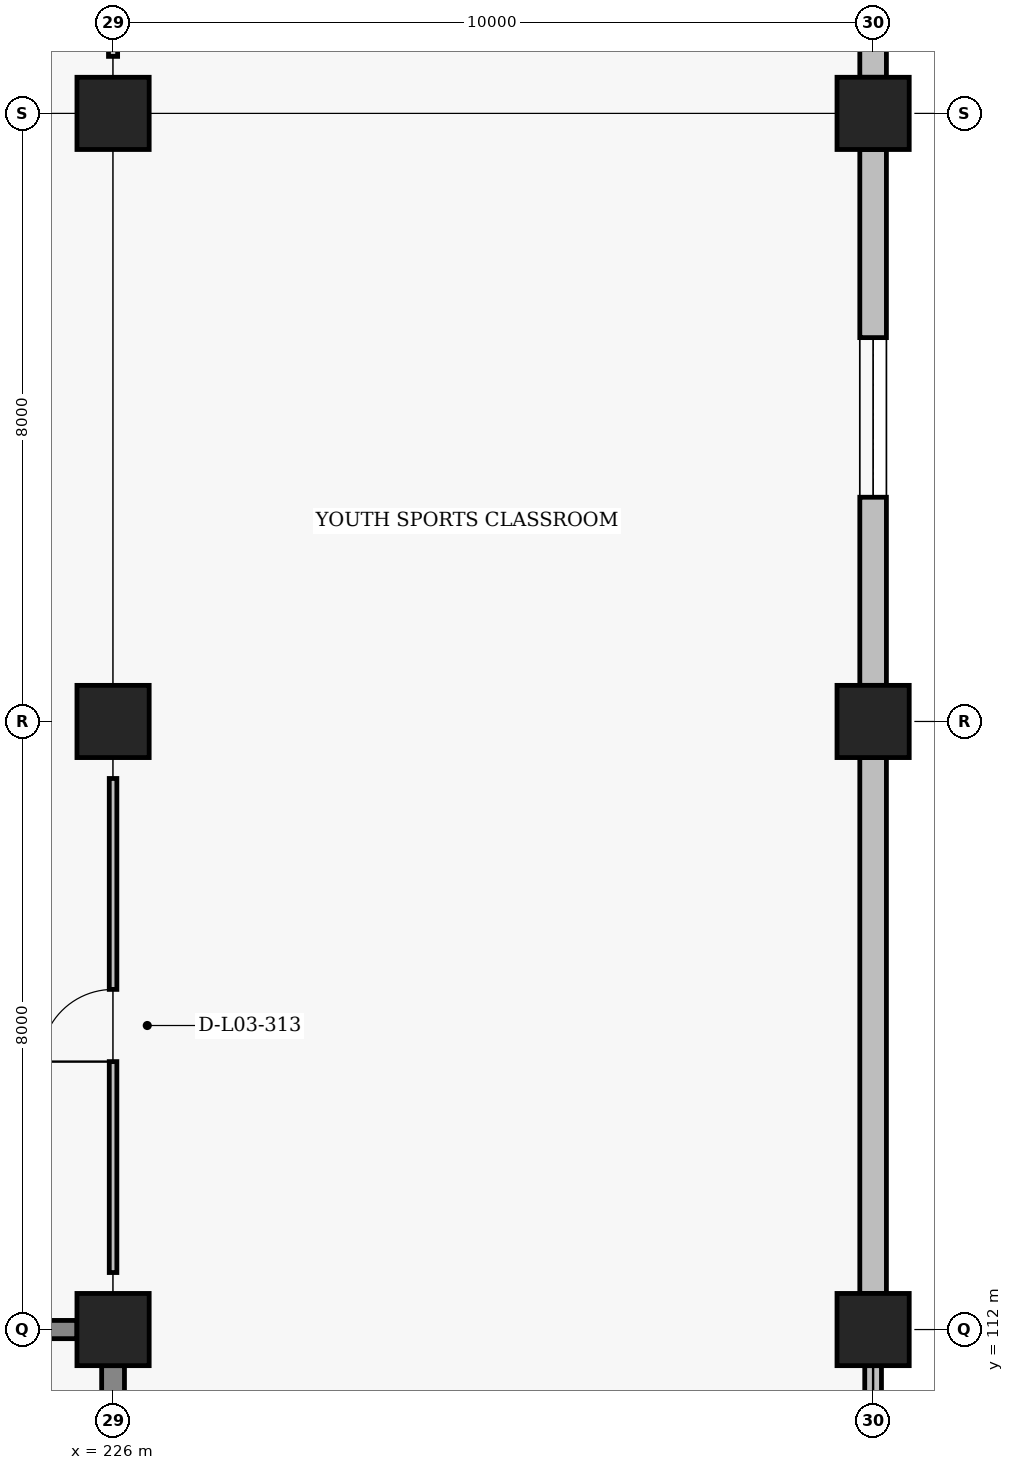
"""IFC4 building model, lengths in metres.
Left out: names, types, materials, properties, quantities, classifications, styles, units other than length and angle.
Written with IfcOpenShell. Run it as: python <this file> out.ifc"""

import sys

from ifc_helpers import new_model, si_unit, direction, frame, frame_2d, origin, origin_2d, place, context, subcontext, project, spatial, rectangle, extrude, element, fill, save


model = new_model("IFC4")
c1 = context("Model", 3, precision=1e-05, world=origin(), true_north=direction((0.0, 1.0)))
c2 = subcontext(c1, "Body", "Model", "MODEL_VIEW")
j1 = project(units=[si_unit("LENGTHUNIT", "METRE"), si_unit("PLANEANGLEUNIT", "RADIAN")], contexts=[c1])
p1 = place(None, origin())
s1 = spatial("IfcSite", under=j1, at=p1, CompositionType="ELEMENT")
p2 = place(p1, origin())
s2 = spatial("IfcBuilding", under=s1, at=p2, CompositionType="ELEMENT")
p3 = place(p2, frame((0.0, 0.0, 9.6)))
s3 = spatial("IfcBuildingStorey", under=s2, at=p3, CompositionType="ELEMENT", Elevation=9.6)
for number, where, z_axis, x_axis in (
    (1, (226.0, 112.0, 0.0), (0.0, 0.0, 1.0), (1.0, 0.0, 0.0)),
    (2, (226.0, 120.0, 0.0), (0.0, 0.0, 1.0), (1.0, 0.0, 0.0)),
    (3, (226.0, 128.0, 0.0), (0.0, 0.0, 1.0), (1.0, 0.0, 0.0)),
    (4, (236.0, 112.0, 0.0), (0.0, 0.0, 1.0), (1.0, 0.0, 0.0)),
    (5, (236.0, 120.0, 0.0), (0.0, 0.0, 1.0), (1.0, 0.0, 0.0)),
    (6, (236.0, 128.0, 0.0), (0.0, 0.0, 1.0), (1.0, 0.0, 0.0)),
):
    element("IfcColumn", number, at=place(p3, frame(where, z_axis=z_axis, x_axis=x_axis)), inside=s3, PredefinedType="COLUMN", context=c2, shape_type="SweptSolid", body=[
        extrude(rectangle(XDim=0.95, YDim=0.95, at=origin_2d()), origin(), (0.0, 0.0, 1.0), 4.8),
    ])
p4 = place(p3, frame((236.0, 104.475, 0.0), z_axis=(0.0, 0.0, 1.0), x_axis=(0.0, 1.0, 0.0)))
e7 = element("IfcWall", 7, at=p4, inside=s3, PredefinedType="PARAPET", context=c2, shape_type="SweptSolid", body=[
    extrude(rectangle(XDim=7.05, YDim=0.22, at=frame_2d((3.525, 0.0))), origin(), (0.0, 0.0, 1.0), 0.16),
])
p5 = place(p3, frame((236.0, 112.475, 0.0), z_axis=(0.0, 0.0, 1.0), x_axis=(0.0, 1.0, 0.0)))
e8 = element("IfcWall", 8, at=p5, inside=s3, PredefinedType="SOLIDWALL", context=c2, shape_type="SweptSolid", body=[
    extrude(rectangle(XDim=7.05, YDim=0.35, at=frame_2d((3.525, 0.0))), origin(), (0.0, 0.0, 1.0), 3.83),
])
p6 = place(p3, frame((236.0, 120.475, 0.0), z_axis=(0.0, 0.0, 1.0), x_axis=(0.0, 1.0, 0.0)))
e9 = element("IfcWall", 9, at=p6, inside=s3, PredefinedType="SOLIDWALL", context=c2, shape_type="SweptSolid", body=[
    extrude(rectangle(XDim=7.05, YDim=0.35, at=frame_2d((3.525, 0.0))), origin(), (0.0, 0.0, 1.0), 3.83),
])
p7 = place(p6, frame((2.475, 0.0, 0.95)))
e10 = element("IfcOpeningElement", 10, at=p7, cuts=e9, PredefinedType="OPENING", context=c2, shape_type="SweptSolid", body=[
    extrude(rectangle(XDim=2.1, YDim=1.9, at=frame_2d((1.05, 0.95))), frame((0.0, 0.185, 0.0), z_axis=(0.0, -1.0, 0.0), x_axis=(1.0, 0.0, 0.0)), (0.0, 0.0, 1.0), 0.37),
])
p8 = place(p3, frame((236.0, 128.475, 0.0), z_axis=(0.0, 0.0, 1.0), x_axis=(0.0, 1.0, 0.0)))
e11 = element("IfcWall", 11, at=p8, inside=s3, PredefinedType="SOLIDWALL", context=c2, shape_type="SweptSolid", body=[
    extrude(rectangle(XDim=7.05, YDim=0.35, at=frame_2d((3.525, 0.0))), origin(), (0.0, 0.0, 1.0), 3.83),
])
p9 = place(p3, frame((216.475, 112.0, 0.0), z_axis=(0.0, 0.0, 1.0), x_axis=(1.0, 0.0, 0.0)))
e12 = element("IfcWall", 12, at=p9, inside=s3, PredefinedType="SHEAR", context=c2, shape_type="SweptSolid", body=[
    extrude(rectangle(XDim=9.05, YDim=0.24, at=frame_2d((4.525, 0.0))), origin(), (0.0, 0.0, 1.0), 3.68),
])
p10 = place(p3, frame((226.0, 104.475, 0.0), z_axis=(0.0, 0.0, 1.0), x_axis=(0.0, 1.0, 0.0)))
e13 = element("IfcWall", 13, at=p10, inside=s3, PredefinedType="SHEAR", context=c2, shape_type="SweptSolid", body=[
    extrude(rectangle(XDim=7.05, YDim=0.3, at=frame_2d((3.525, 0.0))), origin(), (0.0, 0.0, 1.0), 3.83),
])
p11 = place(p3, frame((226.0, 112.75, 0.0), z_axis=(0.0, 0.0, 1.0), x_axis=(0.0, 1.0, 0.0)))
e14 = element("IfcWall", 14, at=p11, inside=s3, PredefinedType="PARTITIONING", context=c2, shape_type="SweptSolid", body=[
    extrude(rectangle(XDim=6.5, YDim=0.1, at=frame_2d((3.25, 0.0))), origin(), (0.0, 0.0, 1.0), 3.93),
])
p12 = place(p11, frame((2.775, 0.0, 0.0)))
e15 = element("IfcOpeningElement", 15, at=p12, cuts=e14, PredefinedType="OPENING", context=c2, shape_type="SweptSolid", body=[
    extrude(rectangle(XDim=0.95, YDim=2.1, at=frame_2d((0.475, 1.05))), frame((0.0, 0.06, 0.0), z_axis=(0.0, -1.0, 0.0), x_axis=(1.0, 0.0, 0.0)), (0.0, 0.0, 1.0), 0.12),
])
p13 = place(p3, frame((226.0, 128.75, 0.0), z_axis=(0.0, 0.0, 1.0), x_axis=(0.0, 1.0, 0.0)))
e16 = element("IfcWall", 16, at=p13, inside=s3, PredefinedType="PARTITIONING", context=c2, shape_type="SweptSolid", body=[
    extrude(rectangle(XDim=6.5, YDim=0.12, at=frame_2d((3.25, 0.0))), origin(), (0.0, 0.0, 1.0), 3.93),
])
p14 = place(p13, frame((2.75, 0.0, 0.0)))
e17 = element("IfcOpeningElement", 17, at=p14, cuts=e16, PredefinedType="OPENING", context=c2, shape_type="SweptSolid", body=[
    extrude(rectangle(XDim=1.0, YDim=2.1, at=frame_2d((0.5, 1.05))), frame((0.0, 0.07, 0.0), z_axis=(0.0, -1.0, 0.0), x_axis=(1.0, 0.0, 0.0)), (0.0, 0.0, 1.0), 0.14),
])
p15 = place(p7, origin())
e18 = element("IfcWindow", 18, at=p15, inside=s3, PartitioningType="SINGLE_PANEL", PredefinedType="WINDOW", context=c2, shape_type="SweptSolid", body=[
    extrude(rectangle(XDim=2.1, YDim=1.9, at=frame_2d((1.05, 0.95))), frame((0.0, 0.03, 0.0), z_axis=(0.0, -1.0, 0.0), x_axis=(1.0, 0.0, 0.0)), (0.0, 0.0, 1.0), 0.06),
])
fill(e10, e18)
p16 = place(p12, origin())
e19 = element("IfcDoor", 19, at=p16, inside=s3, OperationType="SINGLE_SWING_LEFT", PredefinedType="DOOR", context=c2, shape_type="SweptSolid", body=[
    extrude(rectangle(XDim=0.95, YDim=2.1, at=frame_2d((0.475, 1.05))), frame((0.0, 0.025, 0.0), z_axis=(0.0, -1.0, 0.0), x_axis=(1.0, 0.0, 0.0)), (0.0, 0.0, 1.0), 0.05),
])
fill(e15, e19)
save(model, sys.argv[1])
